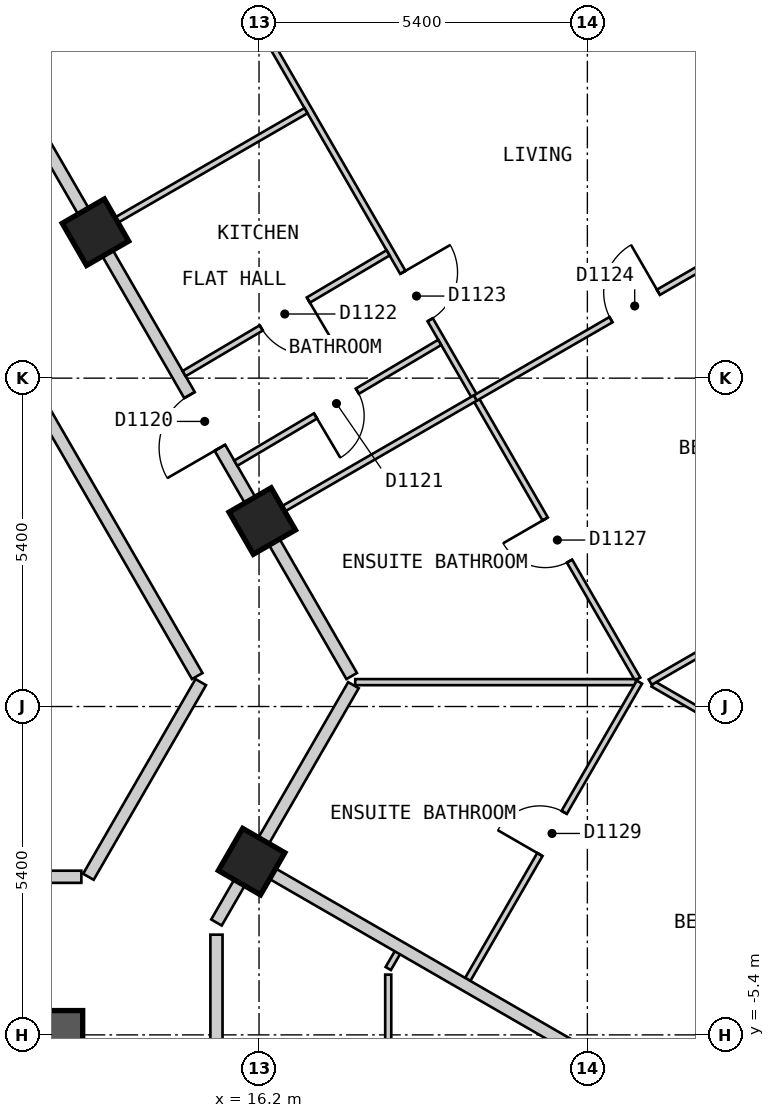
"""IFC4 building model, lengths in metres.
Left out: names, types, materials, properties, quantities, classifications, styles, units other than length and angle.
Written with IfcOpenShell. Run it as: python <this file> out.ifc"""

import sys

from ifc_helpers import new_model, si_unit, direction, frame, frame_2d, origin, origin_2d, place, context, subcontext, project, spatial, polyline, rectangle, outline, extrude, element, fill, save


model = new_model("IFC4")
c1 = context("Model", 3, precision=1e-05, world=origin(), true_north=direction((0.0, 1.0)))
c2 = subcontext(c1, "Body", "Model", "MODEL_VIEW")
j1 = project(units=[si_unit("LENGTHUNIT", "METRE"), si_unit("PLANEANGLEUNIT", "RADIAN")], contexts=[c1])
p1 = place(None, origin())
s1 = spatial("IfcSite", under=j1, at=p1, CompositionType="ELEMENT")
p2 = place(p1, origin())
s2 = spatial("IfcBuilding", under=s1, at=p2, CompositionType="ELEMENT")
p3 = place(p2, frame((0.0, 0.0, 150.6)))
s3 = spatial("IfcBuildingStorey", under=s2, at=p3, CompositionType="ELEMENT", Elevation=150.6)
for number, where, z_axis, x_axis in (
    (1, (16.078, -2.551, 0.0), (0.0, 0.0, 1.0), (0.5, 0.866, 0.0)),
    (2, (16.253, 3.05, 0.0), (0.0, 0.0, 1.0), (-0.5, 0.866, 0.0)),
    (3, (13.51, 7.8, 0.0), (0.0, 0.0, 1.0), (-0.5, 0.866, 0.0)),
):
    element("IfcColumn", number, at=place(p3, frame(where, z_axis=z_axis, x_axis=x_axis)), inside=s3, PredefinedType="COLUMN", context=c2, shape_type="SweptSolid", body=[
        extrude(rectangle(XDim=0.8, YDim=0.8, at=origin_2d()), origin(), (0.0, 0.0, 1.0), 3.0),
    ])
p4 = place(p3, frame((-13.3, -5.4, 0.0), z_axis=(0.0, 0.0, 1.0), x_axis=(1.0, 0.0, 0.0)))
e4 = element("IfcWall", 4, at=p4, inside=s3, PredefinedType="SHEAR", context=c2, shape_type="SweptSolid", body=[
    extrude(rectangle(XDim=26.6, YDim=0.8, at=frame_2d((13.3, 0.0))), origin(), (0.0, 0.0, 1.0), 2.6),
])
p5 = place(p4, frame((23.65, 0.0, 0.0)))
e5 = element("IfcOpeningElement", 5, at=p5, cuts=e4, PredefinedType="OPENING", context=c2, shape_type="SweptSolid", body=[
    extrude(rectangle(XDim=1.2, YDim=2.1, at=frame_2d((0.6, 1.05))), frame((0.0, 0.41, 0.0), z_axis=(0.0, -1.0, 0.0), x_axis=(1.0, 0.0, 0.0)), (0.0, 0.0, 1.0), 0.82),
])
p6 = place(p3, frame((15.862, -23.425, 0.0), z_axis=(0.0, 0.0, 1.0), x_axis=(0.500017503135, 0.866015298109, 0.0)))
e6 = element("IfcWall", 6, at=p6, inside=s3, PredefinedType="SOLIDWALL", context=c2, shape_type="SweptSolid", body=[
    extrude(outline(polyline([(0.0, -0.15), (24.711, -0.15), (24.631, 0.15), (0.08, 0.15), (0.0, -0.15)])), origin(), (0.0, 0.0, 1.0), 2.6),
])
p7 = place(p6, frame((1.4, 0.0, 0.15)))
e7 = element("IfcOpeningElement", 7, at=p7, cuts=e6, PredefinedType="OPENING", context=c2, shape_type="SweptSolid", body=[
    extrude(rectangle(XDim=1.5, YDim=2.1, at=frame_2d((0.75, 1.05))), frame((0.0, 0.16, 0.0), z_axis=(0.0, -1.0, 0.0), x_axis=(1.0, 0.0, 0.0)), (0.0, 0.0, 1.0), 0.32),
])
p8 = place(p6, frame((4.316, 0.0, 0.15)))
e8 = element("IfcOpeningElement", 8, at=p8, cuts=e6, PredefinedType="OPENING", context=c2, shape_type="SweptSolid", body=[
    extrude(rectangle(XDim=1.5, YDim=2.1, at=frame_2d((0.75, 1.05))), frame((0.0, 0.16, 0.0), z_axis=(0.0, -1.0, 0.0), x_axis=(1.0, 0.0, 0.0)), (0.0, 0.0, 1.0), 0.32),
])
p9 = place(p6, frame((7.231, 0.0, 0.15)))
e9 = element("IfcOpeningElement", 9, at=p9, cuts=e6, PredefinedType="OPENING", context=c2, shape_type="SweptSolid", body=[
    extrude(rectangle(XDim=1.5, YDim=2.1, at=frame_2d((0.75, 1.05))), frame((0.0, 0.16, 0.0), z_axis=(0.0, -1.0, 0.0), x_axis=(1.0, 0.0, 0.0)), (0.0, 0.0, 1.0), 0.32),
])
p10 = place(p6, frame((10.147, 0.0, 0.15)))
e10 = element("IfcOpeningElement", 10, at=p10, cuts=e6, PredefinedType="OPENING", context=c2, shape_type="SweptSolid", body=[
    extrude(rectangle(XDim=1.5, YDim=2.1, at=frame_2d((0.75, 1.05))), frame((0.0, 0.16, 0.0), z_axis=(0.0, -1.0, 0.0), x_axis=(1.0, 0.0, 0.0)), (0.0, 0.0, 1.0), 0.32),
])
p11 = place(p6, frame((13.062, 0.0, 0.15)))
e11 = element("IfcOpeningElement", 11, at=p11, cuts=e6, PredefinedType="OPENING", context=c2, shape_type="SweptSolid", body=[
    extrude(rectangle(XDim=1.5, YDim=2.1, at=frame_2d((0.75, 1.05))), frame((0.0, 0.16, 0.0), z_axis=(0.0, -1.0, 0.0), x_axis=(1.0, 0.0, 0.0)), (0.0, 0.0, 1.0), 0.32),
])
p12 = place(p6, frame((15.977, 0.0, 0.15)))
e12 = element("IfcOpeningElement", 12, at=p12, cuts=e6, PredefinedType="OPENING", context=c2, shape_type="SweptSolid", body=[
    extrude(rectangle(XDim=1.5, YDim=2.1, at=frame_2d((0.75, 1.05))), frame((0.0, 0.16, 0.0), z_axis=(0.0, -1.0, 0.0), x_axis=(1.0, 0.0, 0.0)), (0.0, 0.0, 1.0), 0.32),
])
p13 = place(p6, frame((18.893, 0.0, 0.15)))
e13 = element("IfcOpeningElement", 13, at=p13, cuts=e6, PredefinedType="OPENING", context=c2, shape_type="SweptSolid", body=[
    extrude(rectangle(XDim=1.5, YDim=2.1, at=frame_2d((0.75, 1.05))), frame((0.0, 0.16, 0.0), z_axis=(0.0, -1.0, 0.0), x_axis=(1.0, 0.0, 0.0)), (0.0, 0.0, 1.0), 0.32),
])
p14 = place(p6, frame((21.809, 0.0, 0.15)))
e14 = element("IfcOpeningElement", 14, at=p14, cuts=e6, PredefinedType="OPENING", context=c2, shape_type="SweptSolid", body=[
    extrude(rectangle(XDim=1.5, YDim=2.1, at=frame_2d((0.75, 1.05))), frame((0.0, 0.16, 0.0), z_axis=(0.0, -1.0, 0.0), x_axis=(1.0, 0.0, 0.0)), (0.0, 0.0, 1.0), 0.32),
])
p15 = place(p3, frame((28.218, 2.825, 0.0), z_axis=(0.0, 0.0, 1.0), x_axis=(-0.500020536353, 0.866013546791, 0.0)))
e15 = element("IfcWall", 15, at=p15, inside=s3, PredefinedType="SOLIDWALL", context=c2, shape_type="SweptSolid", body=[
    extrude(outline(polyline([(0.0, -0.15), (23.325, -0.15), (23.245, 0.15), (0.08, 0.15), (0.0, -0.15)])), origin(), (0.0, 0.0, 1.0), 2.6),
])
p16 = place(p15, frame((1.314, 0.0, 0.15)))
e16 = element("IfcOpeningElement", 16, at=p16, cuts=e15, PredefinedType="OPENING", context=c2, shape_type="SweptSolid", body=[
    extrude(rectangle(XDim=1.5, YDim=2.1, at=frame_2d((0.75, 1.05))), frame((0.0, 0.16, 0.0), z_axis=(0.0, -1.0, 0.0), x_axis=(1.0, 0.0, 0.0)), (0.0, 0.0, 1.0), 0.32),
])
p17 = place(p15, frame((4.056, 0.0, 0.15)))
e17 = element("IfcOpeningElement", 17, at=p17, cuts=e15, PredefinedType="OPENING", context=c2, shape_type="SweptSolid", body=[
    extrude(rectangle(XDim=1.5, YDim=2.1, at=frame_2d((0.75, 1.05))), frame((0.0, 0.16, 0.0), z_axis=(0.0, -1.0, 0.0), x_axis=(1.0, 0.0, 0.0)), (0.0, 0.0, 1.0), 0.32),
])
p18 = place(p15, frame((6.798, 0.0, 0.15)))
e18 = element("IfcOpeningElement", 18, at=p18, cuts=e15, PredefinedType="OPENING", context=c2, shape_type="SweptSolid", body=[
    extrude(rectangle(XDim=1.5, YDim=2.1, at=frame_2d((0.75, 1.05))), frame((0.0, 0.16, 0.0), z_axis=(0.0, -1.0, 0.0), x_axis=(1.0, 0.0, 0.0)), (0.0, 0.0, 1.0), 0.32),
])
p19 = place(p15, frame((9.541, 0.0, 0.15)))
e19 = element("IfcOpeningElement", 19, at=p19, cuts=e15, PredefinedType="OPENING", context=c2, shape_type="SweptSolid", body=[
    extrude(rectangle(XDim=1.5, YDim=2.1, at=frame_2d((0.75, 1.05))), frame((0.0, 0.16, 0.0), z_axis=(0.0, -1.0, 0.0), x_axis=(1.0, 0.0, 0.0)), (0.0, 0.0, 1.0), 0.32),
])
p20 = place(p15, frame((12.284, 0.0, 0.15)))
e20 = element("IfcOpeningElement", 20, at=p20, cuts=e15, PredefinedType="OPENING", context=c2, shape_type="SweptSolid", body=[
    extrude(rectangle(XDim=1.5, YDim=2.1, at=frame_2d((0.75, 1.05))), frame((0.0, 0.16, 0.0), z_axis=(0.0, -1.0, 0.0), x_axis=(1.0, 0.0, 0.0)), (0.0, 0.0, 1.0), 0.32),
])
p21 = place(p15, frame((15.027, 0.0, 0.15)))
e21 = element("IfcOpeningElement", 21, at=p21, cuts=e15, PredefinedType="OPENING", context=c2, shape_type="SweptSolid", body=[
    extrude(rectangle(XDim=1.5, YDim=2.1, at=frame_2d((0.75, 1.05))), frame((0.0, 0.16, 0.0), z_axis=(0.0, -1.0, 0.0), x_axis=(1.0, 0.0, 0.0)), (0.0, 0.0, 1.0), 0.32),
])
p22 = place(p15, frame((17.769, 0.0, 0.15)))
e22 = element("IfcOpeningElement", 22, at=p22, cuts=e15, PredefinedType="OPENING", context=c2, shape_type="SweptSolid", body=[
    extrude(rectangle(XDim=1.5, YDim=2.1, at=frame_2d((0.75, 1.05))), frame((0.0, 0.16, 0.0), z_axis=(0.0, -1.0, 0.0), x_axis=(1.0, 0.0, 0.0)), (0.0, 0.0, 1.0), 0.32),
])
p23 = place(p15, frame((20.511, 0.0, 0.15)))
e23 = element("IfcOpeningElement", 23, at=p23, cuts=e15, PredefinedType="OPENING", context=c2, shape_type="SweptSolid", body=[
    extrude(rectangle(XDim=1.5, YDim=2.1, at=frame_2d((0.75, 1.05))), frame((0.0, 0.16, 0.0), z_axis=(0.0, -1.0, 0.0), x_axis=(1.0, 0.0, 0.0)), (0.0, 0.0, 1.0), 0.32),
])
p24 = place(p3, frame((7.967, 13.0, 0.0), z_axis=(0.0, 0.0, 1.0), x_axis=(0.50003774998, -0.866003607726, 0.0)))
e24 = element("IfcWall", 24, at=p24, inside=s3, PredefinedType="PARTITIONING", context=c2, shape_type="SweptSolid", body=[
    extrude(rectangle(XDim=14.433, YDim=0.2, at=frame_2d((7.217, 0.0))), origin(), (0.0, 0.0, 1.0), 2.6),
])
p25 = place(p24, frame((6.824, 0.0, 0.0)))
e25 = element("IfcOpeningElement", 25, at=p25, cuts=e24, PredefinedType="OPENING", context=c2, shape_type="SweptSolid", body=[
    extrude(rectangle(XDim=0.9, YDim=2.1, at=frame_2d((0.45, 1.05))), frame((0.0, 0.11, 0.0), z_axis=(0.0, -1.0, 0.0), x_axis=(1.0, 0.0, 0.0)), (0.0, 0.0, 1.0), 0.22),
])
p26 = place(p3, frame((9.296, 15.1, 0.0), z_axis=(0.0, 0.0, 1.0), x_axis=(0.499974024244, -0.866040400375, 0.0)))
e26 = element("IfcWall", 26, at=p26, inside=s3, PredefinedType="PARTITIONING", context=c2, shape_type="SweptSolid", body=[
    extrude(rectangle(XDim=16.857, YDim=0.2, at=frame_2d((8.429, 0.0))), origin(), (0.0, 0.0, 1.0), 2.6),
])
p27 = place(p26, frame((11.522, 0.0, 0.0)))
e27 = element("IfcOpeningElement", 27, at=p27, cuts=e26, PredefinedType="OPENING", context=c2, shape_type="SweptSolid", body=[
    extrude(rectangle(XDim=1.0, YDim=2.1, at=frame_2d((0.5, 1.05))), frame((0.0, 0.11, 0.0), z_axis=(0.0, -1.0, 0.0), x_axis=(1.0, 0.0, 0.0)), (0.0, 0.0, 1.0), 0.22),
])
p28 = place(p3, frame((15.5, -3.752, 0.0), z_axis=(0.0, 0.0, 1.0), x_axis=(0.0, -1.0, 0.0)))
e28 = element("IfcWall", 28, at=p28, inside=s3, PredefinedType="PARTITIONING", context=c2, shape_type="SweptSolid", body=[
    extrude(rectangle(XDim=5.198, YDim=0.2, at=frame_2d((2.599, 0.0))), origin(), (0.0, 0.0, 1.0), 2.6),
])
p29 = place(p3, frame((7.028, -2.8, 0.0), z_axis=(0.0, 0.0, 1.0), x_axis=(1.0, 0.0, 0.0)))
e29 = element("IfcWall", 29, at=p29, inside=s3, PredefinedType="PARTITIONING", context=c2, shape_type="SweptSolid", body=[
    extrude(rectangle(XDim=6.25, YDim=0.2, at=frame_2d((3.125, 0.0))), origin(), (0.0, 0.0, 1.0), 2.6),
])
p30 = place(p3, frame((13.394, -2.8, 0.0), z_axis=(0.0, 0.0, 1.0), x_axis=(0.499968324138, 0.866043691079, 0.0)))
e30 = element("IfcWall", 30, at=p30, inside=s3, PredefinedType="PARTITIONING", context=c2, shape_type="SweptSolid", body=[
    extrude(rectangle(XDim=3.696, YDim=0.2, at=frame_2d((1.848, 0.0))), origin(), (0.0, 0.0, 1.0), 2.6),
])
p31 = place(p3, frame((15.5, -3.552, 0.0), z_axis=(0.0, 0.0, 1.0), x_axis=(0.499914724673, 0.86607463192, 0.0)))
e31 = element("IfcWall", 31, at=p31, inside=s3, PredefinedType="PARTITIONING", context=c2, shape_type="SweptSolid", body=[
    extrude(rectangle(XDim=4.507, YDim=0.2, at=frame_2d((2.253, 0.0))), origin(), (0.0, 0.0, 1.0), 2.6),
])
p32 = place(p3, frame((14.323, 14.487, 0.0), z_axis=(0.0, 0.0, 1.0), x_axis=(0.500011052545, -0.866019022501, 0.0)))
e32 = element("IfcWall", 32, at=p32, inside=s3, PredefinedType="PARTITIONING", context=c2, shape_type="SweptSolid", body=[
    extrude(rectangle(XDim=16.208, YDim=0.1, at=frame_2d((8.104, 0.0))), origin(), (0.0, 0.0, 1.0), 2.6),
])
p33 = place(p32, frame((8.484, 0.0, 0.0)))
e33 = element("IfcOpeningElement", 33, at=p33, cuts=e32, PredefinedType="OPENING", context=c2, shape_type="SweptSolid", body=[
    extrude(rectangle(XDim=0.9, YDim=2.1, at=frame_2d((0.45, 1.05))), frame((0.0, 0.06, 0.0), z_axis=(0.0, -1.0, 0.0), x_axis=(1.0, 0.0, 0.0)), (0.0, 0.0, 1.0), 0.12),
])
p34 = place(p32, frame((2.252, 0.0, 0.0)))
e34 = element("IfcOpeningElement", 34, at=p34, cuts=e32, PredefinedType="OPENING", context=c2, shape_type="SweptSolid", body=[
    extrude(rectangle(XDim=0.8, YDim=2.1, at=frame_2d((0.4, 1.05))), frame((0.0, 0.06, 0.0), z_axis=(0.0, -1.0, 0.0), x_axis=(1.0, 0.0, 0.0)), (0.0, 0.0, 1.0), 0.12),
])
p35 = place(p32, frame((13.167, 0.0, 0.0)))
e35 = element("IfcOpeningElement", 35, at=p35, cuts=e32, PredefinedType="OPENING", context=c2, shape_type="SweptSolid", body=[
    extrude(rectangle(XDim=0.8, YDim=2.1, at=frame_2d((0.4, 1.05))), frame((0.0, 0.06, 0.0), z_axis=(0.0, -1.0, 0.0), x_axis=(1.0, 0.0, 0.0)), (0.0, 0.0, 1.0), 0.12),
])
p36 = place(p3, frame((18.325, -4.409, 0.0), z_axis=(0.0, 0.0, 1.0), x_axis=(0.0, -1.0, 0.0)))
e36 = element("IfcWall", 36, at=p36, inside=s3, PredefinedType="PARTITIONING", context=c2, shape_type="SweptSolid", body=[
    extrude(rectangle(XDim=6.115, YDim=0.1, at=frame_2d((3.058, 0.0))), origin(), (0.0, 0.0, 1.0), 2.6),
])
p37 = place(p36, frame((2.636, 0.0, 0.0)))
e37 = element("IfcOpeningElement", 37, at=p37, cuts=e36, PredefinedType="OPENING", context=c2, shape_type="SweptSolid", body=[
    extrude(rectangle(XDim=0.8, YDim=2.1, at=frame_2d((0.4, 1.05))), frame((0.0, 0.06, 0.0), z_axis=(0.0, -1.0, 0.0), x_axis=(1.0, 0.0, 0.0)), (0.0, 0.0, 1.0), 0.12),
])
p38 = place(p3, frame((22.679, 0.372, 0.0), z_axis=(0.0, 0.0, 1.0), x_axis=(0.865985260119, -0.500069524424, 0.0)))
e38 = element("IfcWall", 38, at=p38, inside=s3, PredefinedType="PARTITIONING", context=c2, shape_type="SweptSolid", body=[
    extrude(rectangle(XDim=5.845, YDim=0.1, at=frame_2d((2.923, 0.0))), origin(), (0.0, 0.0, 1.0), 2.6),
])
p39 = place(p38, frame((2.444, 0.0, 0.0)))
e39 = element("IfcOpeningElement", 39, at=p39, cuts=e38, PredefinedType="OPENING", context=c2, shape_type="SweptSolid", body=[
    extrude(rectangle(XDim=0.9, YDim=2.1, at=frame_2d((0.45, 1.05))), frame((0.0, 0.06, 0.0), z_axis=(0.0, -1.0, 0.0), x_axis=(1.0, 0.0, 0.0)), (0.0, 0.0, 1.0), 0.12),
])
p40 = place(p3, frame((17.782, 0.401, 0.0), z_axis=(0.0, 0.0, 1.0), x_axis=(1.0, 0.0, 0.0)))
e40 = element("IfcWall", 40, at=p40, inside=s3, PredefinedType="PARTITIONING", context=c2, shape_type="SweptSolid", body=[
    extrude(rectangle(XDim=4.616, YDim=0.1, at=frame_2d((2.308, 0.0))), origin(), (0.0, 0.0, 1.0), 2.6),
])
p41 = place(p3, frame((18.325, -4.309, 0.0), z_axis=(0.0, 0.0, 1.0), x_axis=(0.5014706583, 0.865174652232, 0.0)))
e41 = element("IfcWall", 41, at=p41, inside=s3, PredefinedType="PARTITIONING", context=c2, shape_type="SweptSolid", body=[
    extrude(rectangle(XDim=0.399, YDim=0.1, at=frame_2d((0.199, 0.0))), origin(), (0.0, 0.0, 1.0), 2.6),
])
p42 = place(p3, frame((19.633, -4.488, 0.0), z_axis=(0.0, 0.0, 1.0), x_axis=(0.500050624552, 0.865996173713, 0.0)))
e42 = element("IfcWall", 42, at=p42, inside=s3, PredefinedType="PARTITIONING", context=c2, shape_type="SweptSolid", body=[
    extrude(rectangle(XDim=5.646, YDim=0.1, at=frame_2d((2.823, 0.0))), origin(), (0.0, 0.0, 1.0), 2.6),
])
p43 = place(p42, frame((2.372, 0.0, 0.0)))
e43 = element("IfcOpeningElement", 43, at=p43, cuts=e42, PredefinedType="OPENING", context=c2, shape_type="SweptSolid", body=[
    extrude(rectangle(XDim=0.8, YDim=2.1, at=frame_2d((0.4, 1.05))), frame((0.0, 0.06, 0.0), z_axis=(0.0, -1.0, 0.0), x_axis=(1.0, 0.0, 0.0)), (0.0, 0.0, 1.0), 0.12),
])
p44 = place(p3, frame((16.339, 3.1, 0.0), z_axis=(0.0, 0.0, 1.0), x_axis=(0.866031112038, 0.499990112884, 0.0)))
e44 = element("IfcWall", 44, at=p44, inside=s3, PredefinedType="PARTITIONING", context=c2, shape_type="SweptSolid", body=[
    extrude(rectangle(XDim=3.948, YDim=0.1, at=frame_2d((1.974, 0.0))), origin(), (0.0, 0.0, 1.0), 2.6),
])
p45 = place(p3, frame((22.634, 0.401, 0.0), z_axis=(0.0, 0.0, 1.0), x_axis=(0.86601325737, 0.500021037617, 0.0)))
e45 = element("IfcWall", 45, at=p45, inside=s3, PredefinedType="PARTITIONING", context=c2, shape_type="SweptSolid", body=[
    extrude(rectangle(XDim=5.898, YDim=0.1, at=frame_2d((2.949, 0.0))), origin(), (0.0, 0.0, 1.0), 2.6),
])
p46 = place(p45, frame((2.499, 0.0, 0.0)))
e46 = element("IfcOpeningElement", 46, at=p46, cuts=e45, PredefinedType="OPENING", context=c2, shape_type="SweptSolid", body=[
    extrude(rectangle(XDim=0.9, YDim=2.1, at=frame_2d((0.45, 1.05))), frame((0.0, 0.06, 0.0), z_axis=(0.0, -1.0, 0.0), x_axis=(1.0, 0.0, 0.0)), (0.0, 0.0, 1.0), 0.12),
])
p47 = place(p3, frame((13.597, 7.85, 0.0), z_axis=(0.0, 0.0, 1.0), x_axis=(0.865979019114, 0.500080332001, 0.0)))
e47 = element("IfcWall", 47, at=p47, inside=s3, PredefinedType="PARTITIONING", context=c2, shape_type="SweptSolid", body=[
    extrude(rectangle(XDim=3.897, YDim=0.1, at=frame_2d((1.949, 0.0))), origin(), (0.0, 0.0, 1.0), 2.6),
])
p48 = place(p3, frame((15.818, 4.002, 0.0), z_axis=(0.0, 0.0, 1.0), x_axis=(0.860457323494, 0.509522516132, 0.0)))
e48 = element("IfcWall", 48, at=p48, inside=s3, PredefinedType="PARTITIONING", context=c2, shape_type="SweptSolid", body=[
    extrude(rectangle(XDim=3.898, YDim=0.1, at=frame_2d((1.949, 0.0))), origin(), (0.0, 0.0, 1.0), 2.6),
])
p49 = place(p48, frame((1.524, 0.0, 0.0)))
e49 = element("IfcOpeningElement", 49, at=p49, cuts=e48, PredefinedType="OPENING", context=c2, shape_type="SweptSolid", body=[
    extrude(rectangle(XDim=0.8, YDim=2.1, at=frame_2d((0.4, 1.05))), frame((0.0, 0.06, 0.0), z_axis=(0.0, -1.0, 0.0), x_axis=(1.0, 0.0, 0.0)), (0.0, 0.0, 1.0), 0.12),
])
p50 = place(p3, frame((14.968, 5.475, 0.0), z_axis=(0.0, 0.0, 1.0), x_axis=(0.860594613521, 0.509290596005, 0.0)))
e50 = element("IfcWall", 50, at=p50, inside=s3, PredefinedType="PARTITIONING", context=c2, shape_type="SweptSolid", body=[
    extrude(rectangle(XDim=3.897, YDim=0.1, at=frame_2d((1.949, 0.0))), origin(), (0.0, 0.0, 1.0), 2.6),
])
p51 = place(p50, frame((1.474, 0.0, 0.0)))
e51 = element("IfcOpeningElement", 51, at=p51, cuts=e50, PredefinedType="OPENING", context=c2, shape_type="SweptSolid", body=[
    extrude(rectangle(XDim=0.9, YDim=2.1, at=frame_2d((0.45, 1.05))), frame((0.0, 0.06, 0.0), z_axis=(0.0, -1.0, 0.0), x_axis=(1.0, 0.0, 0.0)), (0.0, 0.0, 1.0), 0.12),
])
p52 = place(p3, frame((16.165, -2.601, 0.0), z_axis=(0.0, 0.0, 1.0), x_axis=(0.866016855193, -0.500014806302, 0.0)))
e52 = element("IfcWall", 52, at=p52, inside=s3, PredefinedType="PARTITIONING", context=c2, shape_type="SweptSolid", body=[
    extrude(rectangle(XDim=10.0, YDim=0.2, at=frame_2d((5.0, 0.0))), origin(), (0.0, 0.0, 1.0), 2.6),
])
p53 = place(p3, frame((19.758, 5.074, 0.0), z_axis=(0.0, 0.0, 1.0), x_axis=(0.866007554612, 0.500030914399, 0.0)))
e53 = element("IfcWall", 53, at=p53, inside=s3, PredefinedType="PARTITIONING", context=c2, shape_type="SweptSolid", body=[
    extrude(rectangle(XDim=6.052, YDim=0.1, at=frame_2d((3.026, 0.0))), origin(), (0.0, 0.0, 1.0), 2.6),
])
p54 = place(p53, frame((2.576, 0.0, 0.0)))
e54 = element("IfcOpeningElement", 54, at=p54, cuts=e53, PredefinedType="OPENING", context=c2, shape_type="SweptSolid", body=[
    extrude(rectangle(XDim=0.9, YDim=2.1, at=frame_2d((0.45, 1.05))), frame((0.0, 0.06, 0.0), z_axis=(0.0, -1.0, 0.0), x_axis=(1.0, 0.0, 0.0)), (0.0, 0.0, 1.0), 0.12),
])
p55 = place(p27, origin())
e55 = element("IfcDoor", 55, at=p55, inside=s3, OperationType="SINGLE_SWING_RIGHT", PredefinedType="DOOR", context=c2, shape_type="SweptSolid", body=[
    extrude(rectangle(XDim=1.0, YDim=2.1, at=frame_2d((0.5, 1.05))), frame((0.0, 0.025, 0.0), z_axis=(0.0, -1.0, 0.0), x_axis=(1.0, 0.0, 0.0)), (0.0, 0.0, 1.0), 0.05),
])
fill(e27, e55)
p56 = place(p49, origin())
e56 = element("IfcDoor", 56, at=p56, inside=s3, OperationType="SINGLE_SWING_LEFT", PredefinedType="DOOR", context=c2, shape_type="SweptSolid", body=[
    extrude(rectangle(XDim=0.8, YDim=2.1, at=frame_2d((0.4, 1.05))), frame((0.0, 0.025, 0.0), z_axis=(0.0, -1.0, 0.0), x_axis=(1.0, 0.0, 0.0)), (0.0, 0.0, 1.0), 0.05),
])
fill(e49, e56)
p57 = place(p51, origin())
e57 = element("IfcDoor", 57, at=p57, inside=s3, OperationType="SINGLE_SWING_RIGHT", PredefinedType="DOOR", context=c2, shape_type="SweptSolid", body=[
    extrude(rectangle(XDim=0.9, YDim=2.1, at=frame_2d((0.45, 1.05))), frame((0.0, 0.025, 0.0), z_axis=(0.0, -1.0, 0.0), x_axis=(1.0, 0.0, 0.0)), (0.0, 0.0, 1.0), 0.05),
])
fill(e51, e57)
p58 = place(p33, origin())
e58 = element("IfcDoor", 58, at=p58, inside=s3, OperationType="SINGLE_SWING_LEFT", PredefinedType="DOOR", context=c2, shape_type="SweptSolid", body=[
    extrude(rectangle(XDim=0.9, YDim=2.1, at=frame_2d((0.45, 1.05))), frame((0.0, 0.025, 0.0), z_axis=(0.0, -1.0, 0.0), x_axis=(1.0, 0.0, 0.0)), (0.0, 0.0, 1.0), 0.05),
])
fill(e33, e58)
p59 = place(p54, origin())
e59 = element("IfcDoor", 59, at=p59, inside=s3, OperationType="SINGLE_SWING_RIGHT", PredefinedType="DOOR", context=c2, shape_type="SweptSolid", body=[
    extrude(rectangle(XDim=0.9, YDim=2.1, at=frame_2d((0.45, 1.05))), frame((0.0, 0.025, 0.0), z_axis=(0.0, -1.0, 0.0), x_axis=(1.0, 0.0, 0.0)), (0.0, 0.0, 1.0), 0.05),
])
fill(e54, e59)
p60 = place(p35, origin())
e60 = element("IfcDoor", 60, at=p60, inside=s3, OperationType="SINGLE_SWING_LEFT", PredefinedType="DOOR", context=c2, shape_type="SweptSolid", body=[
    extrude(rectangle(XDim=0.8, YDim=2.1, at=frame_2d((0.4, 1.05))), frame((0.0, 0.025, 0.0), z_axis=(0.0, -1.0, 0.0), x_axis=(1.0, 0.0, 0.0)), (0.0, 0.0, 1.0), 0.05),
])
fill(e35, e60)
p61 = place(p43, origin())
e61 = element("IfcDoor", 61, at=p61, inside=s3, OperationType="SINGLE_SWING_LEFT", PredefinedType="DOOR", context=c2, shape_type="SweptSolid", body=[
    extrude(rectangle(XDim=0.8, YDim=2.1, at=frame_2d((0.4, 1.05))), frame((0.0, 0.025, 0.0), z_axis=(0.0, -1.0, 0.0), x_axis=(1.0, 0.0, 0.0)), (0.0, 0.0, 1.0), 0.05),
])
fill(e43, e61)
save(model, sys.argv[1])
